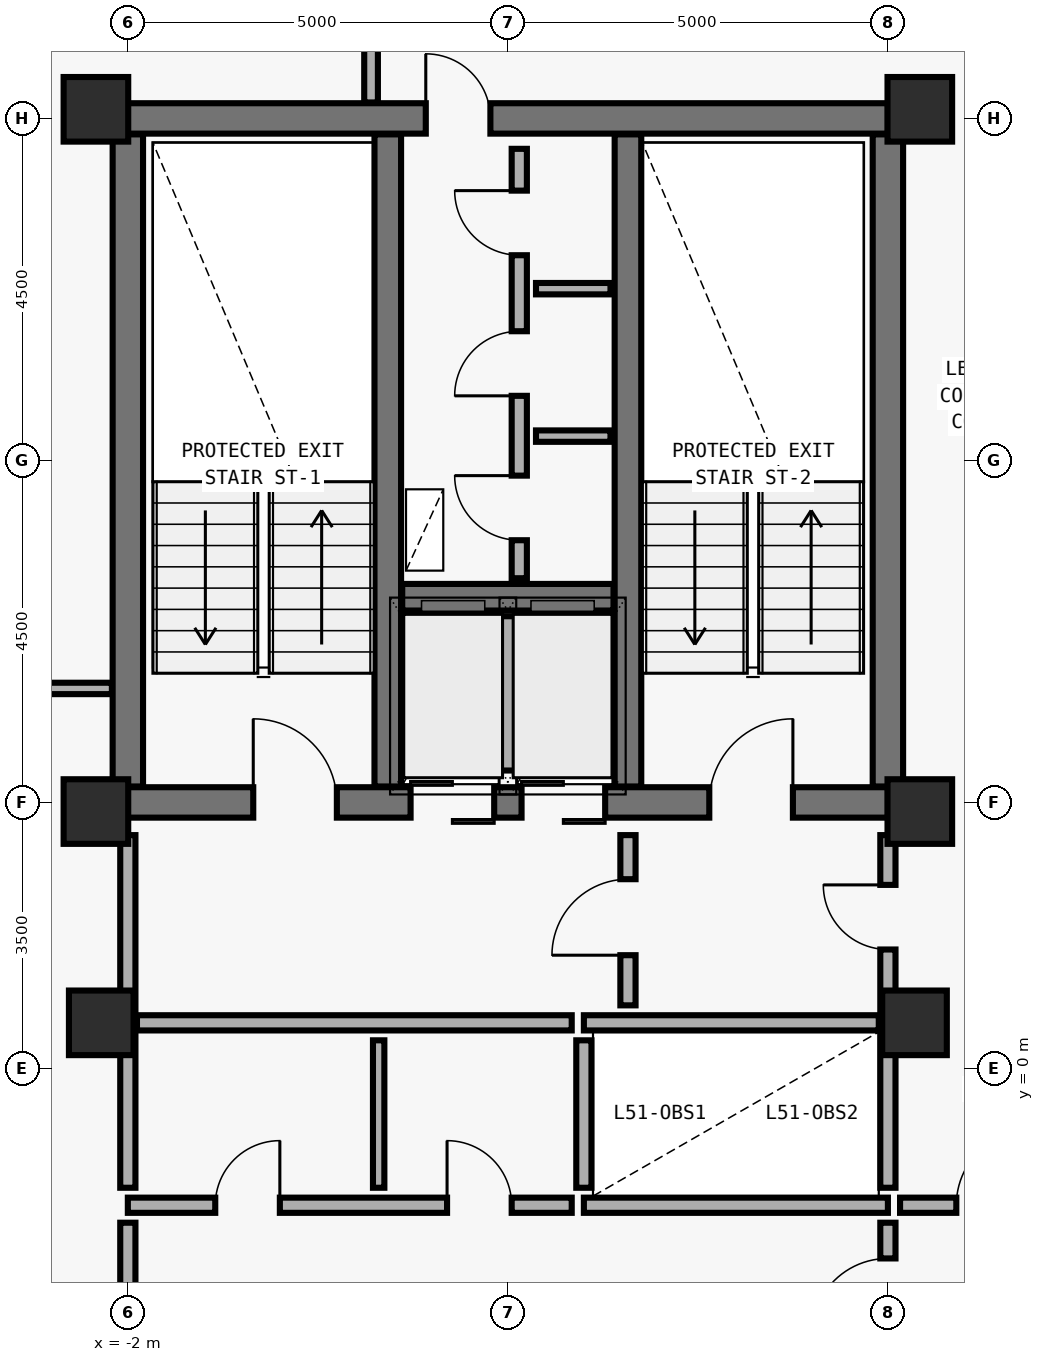
"""IFC4 building model, lengths in metres.
Left out: names, types, materials, properties, quantities, classifications, styles, units other than length and angle.
Written with IfcOpenShell. Run it as: python <this file> out.ifc"""

import sys

from ifc_helpers import new_model, si_unit, direction, frame, frame_2d, origin, origin_2d, place, context, subcontext, project, spatial, rectangle, extrude, element, fill, save


model = new_model("IFC4")
c1 = context("Model", 3, precision=1e-05, world=origin(), true_north=direction((0.0, 1.0)))
c2 = subcontext(c1, "Body", "Model", "MODEL_VIEW")
j1 = project(units=[si_unit("LENGTHUNIT", "METRE"), si_unit("PLANEANGLEUNIT", "RADIAN")], contexts=[c1])
p1 = place(None, origin())
s1 = spatial("IfcSite", under=j1, at=p1, CompositionType="ELEMENT")
p2 = place(p1, origin())
s2 = spatial("IfcBuilding", under=s1, at=p2, CompositionType="ELEMENT")
p3 = place(p2, frame((0.0, 0.0, 204.0)))
s3 = spatial("IfcBuildingStorey", under=s2, at=p3, CompositionType="ELEMENT", Elevation=204.0)
p4 = place(p3, frame((-2.0, 3.5, 0.0), z_axis=(0.0, 0.0, 1.0), x_axis=(1.0, 0.0, 0.0)))
e1 = element("IfcWall", 1, at=p4, inside=s3, PredefinedType="SHEAR", context=c2, shape_type="SweptSolid", body=[
    extrude(rectangle(XDim=10.0, YDim=0.4, at=frame_2d((5.0, 0.0))), origin(), (0.0, 0.0, 1.0), 3.592),
])
p5 = place(p4, frame((1.65, 0.0, 0.0)))
e2 = element("IfcOpeningElement", 2, at=p5, cuts=e1, PredefinedType="OPENING", context=c2, shape_type="SweptSolid", body=[
    extrude(rectangle(XDim=1.1, YDim=2.15, at=frame_2d((0.55, 1.075))), frame((0.0, 0.21, 0.0), z_axis=(0.0, -1.0, 0.0), x_axis=(1.0, 0.0, 0.0)), (0.0, 0.0, 1.0), 0.42),
])
p6 = place(p4, frame((7.65, 0.0, 0.0)))
e3 = element("IfcOpeningElement", 3, at=p6, cuts=e1, PredefinedType="OPENING", context=c2, shape_type="SweptSolid", body=[
    extrude(rectangle(XDim=1.1, YDim=2.15, at=frame_2d((0.55, 1.075))), frame((0.0, 0.21, 0.0), z_axis=(0.0, -1.0, 0.0), x_axis=(1.0, 0.0, 0.0)), (0.0, 0.0, 1.0), 0.42),
])
p7 = place(p4, frame((3.72, 0.0, 0.0)))
e4 = element("IfcOpeningElement", 4, at=p7, cuts=e1, PredefinedType="OPENING", context=c2, shape_type="SweptSolid", body=[
    extrude(rectangle(XDim=1.1, YDim=2.2, at=frame_2d((0.55, 1.1))), frame((0.0, 0.21, 0.0), z_axis=(0.0, -1.0, 0.0), x_axis=(1.0, 0.0, 0.0)), (0.0, 0.0, 1.0), 0.42),
])
p8 = place(p4, frame((5.18, 0.0, 0.0)))
e5 = element("IfcOpeningElement", 5, at=p8, cuts=e1, PredefinedType="OPENING", context=c2, shape_type="SweptSolid", body=[
    extrude(rectangle(XDim=1.1, YDim=2.2, at=frame_2d((0.55, 1.1))), frame((0.0, 0.21, 0.0), z_axis=(0.0, -1.0, 0.0), x_axis=(1.0, 0.0, 0.0)), (0.0, 0.0, 1.0), 0.42),
])
p9 = place(p3, frame((-2.0, 12.5, 0.0), z_axis=(0.0, 0.0, 1.0), x_axis=(1.0, 0.0, 0.0)))
e6 = element("IfcWall", 6, at=p9, inside=s3, PredefinedType="SHEAR", context=c2, shape_type="SweptSolid", body=[
    extrude(rectangle(XDim=10.0, YDim=0.4, at=frame_2d((5.0, 0.0))), origin(), (0.0, 0.0, 1.0), 3.592),
])
p10 = place(p9, frame((3.92, 0.0, 0.0)))
e7 = element("IfcOpeningElement", 7, at=p10, cuts=e6, PredefinedType="OPENING", context=c2, shape_type="SweptSolid", body=[
    extrude(rectangle(XDim=0.85, YDim=2.1, at=frame_2d((0.425, 1.05))), frame((0.0, 0.21, 0.0), z_axis=(0.0, -1.0, 0.0), x_axis=(1.0, 0.0, 0.0)), (0.0, 0.0, 1.0), 0.42),
])
for number, where, z_axis, x_axis in (
    (8, (-2.0, 3.71, 0.0), (0.0, 0.0, 1.0), (0.0, 1.0, 0.0)),
    (9, (8.0, 3.71, 0.0), (0.0, 0.0, 1.0), (0.0, 1.0, 0.0)),
):
    element("IfcWall", number, at=place(p3, frame(where, z_axis=z_axis, x_axis=x_axis)), inside=s3, PredefinedType="SHEAR", context=c2, shape_type="SweptSolid", body=[
        extrude(rectangle(XDim=8.58, YDim=0.4, at=frame_2d((4.29, 0.0))), origin(), (0.0, 0.0, 1.0), 3.592),
    ])
for number, where, z_axis, x_axis in (
    (10, (1.42, 3.71, 0.0), (0.0, 0.0, 1.0), (0.0, 1.0, 0.0)),
    (11, (4.58, 3.71, 0.0), (0.0, 0.0, 1.0), (0.0, 1.0, 0.0)),
):
    element("IfcWall", number, at=place(p3, frame(where, z_axis=z_axis, x_axis=x_axis)), inside=s3, PredefinedType="SHEAR", context=c2, shape_type="SweptSolid", body=[
        extrude(rectangle(XDim=8.58, YDim=0.35, at=frame_2d((4.29, 0.0))), origin(), (0.0, 0.0, 1.0), 3.592),
    ])
p11 = place(p3, frame((1.61, 6.2, 0.0), z_axis=(0.0, 0.0, 1.0), x_axis=(1.0, 0.0, 0.0)))
e12 = element("IfcWall", 12, at=p11, inside=s3, PredefinedType="SHEAR", context=c2, shape_type="SweptSolid", body=[
    extrude(rectangle(XDim=2.78, YDim=0.35, at=frame_2d((1.39, 0.0))), origin(), (0.0, 0.0, 1.0), 3.592),
])
for number, where, z_axis, x_axis in (
    (13, (-2.42, 12.62, 0.0), (0.0, 0.0, 1.0), (1.0, 0.0, 0.0)),
    (14, (8.42, 12.62, 0.0), (0.0, 0.0, 1.0), (1.0, 0.0, 0.0)),
    (15, (-2.42, 3.38, 0.0), (0.0, 0.0, 1.0), (1.0, 0.0, 0.0)),
    (16, (8.42, 3.38, 0.0), (0.0, 0.0, 1.0), (1.0, 0.0, 0.0)),
    (17, (-2.35, 0.6, 0.0), (0.0, 0.0, 1.0), (1.0, 0.0, 0.0)),
    (18, (8.35, 0.6, 0.0), (0.0, 0.0, 1.0), (1.0, 0.0, 0.0)),
):
    element("IfcColumn", number, at=place(p3, frame(where, z_axis=z_axis, x_axis=x_axis)), inside=s3, PredefinedType="COLUMN", context=c2, shape_type="SweptSolid", body=[
        extrude(rectangle(XDim=0.85, YDim=0.85, at=origin_2d()), origin(), (0.0, 0.0, 1.0), 3.575),
    ])
p12 = place(p3, frame((3.0, 3.92, 0.0), z_axis=(0.0, 0.0, 1.0), x_axis=(0.0, 1.0, 0.0)))
e19 = element("IfcWall", 19, at=p12, inside=s3, PredefinedType="SOLIDWALL", context=c2, shape_type="SweptSolid", body=[
    extrude(rectangle(XDim=2.03, YDim=0.2, at=frame_2d((1.015, 0.0))), origin(), (0.0, 0.0, 1.0), 3.36),
])
p13 = place(p3, frame((4.0, 0.6, 0.0), z_axis=(0.0, 0.0, 1.0), x_axis=(1.0, 0.0, 0.0)))
e20 = element("IfcWall", 20, at=p13, inside=s3, PredefinedType="SOLIDWALL", context=c2, shape_type="SweptSolid", body=[
    extrude(rectangle(XDim=3.88, YDim=0.2, at=frame_2d((1.94, 0.0))), origin(), (0.0, 0.0, 1.0), 3.012),
])
p14 = place(p3, frame((4.0, -1.8, 0.0), z_axis=(0.0, 0.0, 1.0), x_axis=(1.0, 0.0, 0.0)))
e21 = element("IfcWall", 21, at=p14, inside=s3, PredefinedType="SOLIDWALL", context=c2, shape_type="SweptSolid", body=[
    extrude(rectangle(XDim=4.0, YDim=0.2, at=frame_2d((2.0, 0.0))), origin(), (0.0, 0.0, 1.0), 3.36),
])
p15 = place(p3, frame((4.0, -1.57, 0.0), z_axis=(0.0, 0.0, 1.0), x_axis=(0.0, 1.0, 0.0)))
e22 = element("IfcWall", 22, at=p15, inside=s3, PredefinedType="SOLIDWALL", context=c2, shape_type="SweptSolid", body=[
    extrude(rectangle(XDim=1.94, YDim=0.2, at=frame_2d((0.97, 0.0))), origin(), (0.0, 0.0, 1.0), 3.36),
])
p16 = place(p3, frame((8.0, -1.57, 0.0), z_axis=(0.0, 0.0, 1.0), x_axis=(0.0, 1.0, 0.0)))
e23 = element("IfcWall", 23, at=p16, inside=s3, PredefinedType="SOLIDWALL", context=c2, shape_type="SweptSolid", body=[
    extrude(rectangle(XDim=2.05, YDim=0.2, at=frame_2d((1.025, 0.0))), origin(), (0.0, 0.0, 1.0), 3.012),
])
p17 = place(p3, frame((3.15, 6.45, 0.0), z_axis=(0.0, 0.0, 1.0), x_axis=(0.0, 1.0, 0.0)))
e24 = element("IfcWall", 24, at=p17, inside=s3, PredefinedType="MOVABLE", context=c2, shape_type="SweptSolid", body=[
    extrude(rectangle(XDim=5.65, YDim=0.2, at=frame_2d((2.825, 0.0))), origin(), (0.0, 0.0, 1.0), 3.36),
])
p18 = place(p17, frame((0.5, 0.0, 0.0)))
e25 = element("IfcOpeningElement", 25, at=p18, cuts=e24, PredefinedType="OPENING", context=c2, shape_type="SweptSolid", body=[
    extrude(rectangle(XDim=0.85, YDim=2.1, at=frame_2d((0.425, 1.05))), frame((0.0, 0.11, 0.0), z_axis=(0.0, -1.0, 0.0), x_axis=(1.0, 0.0, 0.0)), (0.0, 0.0, 1.0), 0.22),
])
p19 = place(p17, frame((2.4, 0.0, 0.0)))
e26 = element("IfcOpeningElement", 26, at=p19, cuts=e24, PredefinedType="OPENING", context=c2, shape_type="SweptSolid", body=[
    extrude(rectangle(XDim=0.85, YDim=2.1, at=frame_2d((0.425, 1.05))), frame((0.0, 0.11, 0.0), z_axis=(0.0, -1.0, 0.0), x_axis=(1.0, 0.0, 0.0)), (0.0, 0.0, 1.0), 0.22),
])
p20 = place(p17, frame((4.25, 0.0, 0.0)))
e27 = element("IfcOpeningElement", 27, at=p20, cuts=e24, PredefinedType="OPENING", context=c2, shape_type="SweptSolid", body=[
    extrude(rectangle(XDim=0.85, YDim=2.1, at=frame_2d((0.425, 1.05))), frame((0.0, 0.11, 0.0), z_axis=(0.0, -1.0, 0.0), x_axis=(1.0, 0.0, 0.0)), (0.0, 0.0, 1.0), 0.22),
])
p21 = place(p3, frame((4.58, 0.83, 0.0), z_axis=(0.0, 0.0, 1.0), x_axis=(0.0, 1.0, 0.0)))
e28 = element("IfcWall", 28, at=p21, inside=s3, PredefinedType="MOVABLE", context=c2, shape_type="SweptSolid", body=[
    extrude(rectangle(XDim=2.24, YDim=0.2, at=frame_2d((1.12, 0.0))), origin(), (0.0, 0.0, 1.0), 3.36),
])
p22 = place(p21, frame((0.66, 0.0, 0.0)))
e29 = element("IfcOpeningElement", 29, at=p22, cuts=e28, PredefinedType="OPENING", context=c2, shape_type="SweptSolid", body=[
    extrude(rectangle(XDim=1.0, YDim=2.1, at=frame_2d((0.5, 1.05))), frame((0.0, 0.11, 0.0), z_axis=(0.0, -1.0, 0.0), x_axis=(1.0, 0.0, 0.0)), (0.0, 0.0, 1.0), 0.22),
])
p23 = place(p3, frame((8.0, 0.72, 0.0), z_axis=(0.0, 0.0, 1.0), x_axis=(0.0, 1.0, 0.0)))
e30 = element("IfcWall", 30, at=p23, inside=s3, PredefinedType="MOVABLE", context=c2, shape_type="SweptSolid", body=[
    extrude(rectangle(XDim=2.35, YDim=0.2, at=frame_2d((1.175, 0.0))), origin(), (0.0, 0.0, 1.0), 2.692),
])
p24 = place(p23, frame((0.845, 0.0, 0.0)))
e31 = element("IfcOpeningElement", 31, at=p24, cuts=e30, PredefinedType="OPENING", context=c2, shape_type="SweptSolid", body=[
    extrude(rectangle(XDim=0.85, YDim=2.1, at=frame_2d((0.425, 1.05))), frame((0.0, 0.11, 0.0), z_axis=(0.0, -1.0, 0.0), x_axis=(1.0, 0.0, 0.0)), (0.0, 0.0, 1.0), 0.22),
])
p25 = place(p3, frame((8.0, -3.97, 0.0), z_axis=(0.0, 0.0, 1.0), x_axis=(0.0, 1.0, 0.0)))
e32 = element("IfcWall", 32, at=p25, inside=s3, PredefinedType="MOVABLE", context=c2, shape_type="SweptSolid", body=[
    extrude(rectangle(XDim=1.94, YDim=0.2, at=frame_2d((0.97, 0.0))), origin(), (0.0, 0.0, 1.0), 3.012),
])
p26 = place(p25, frame((0.47, 0.0, 0.0)))
e33 = element("IfcOpeningElement", 33, at=p26, cuts=e32, PredefinedType="OPENING", context=c2, shape_type="SweptSolid", body=[
    extrude(rectangle(XDim=1.0, YDim=2.1, at=frame_2d((0.5, 1.05))), frame((0.0, 0.11, 0.0), z_axis=(0.0, -1.0, 0.0), x_axis=(1.0, 0.0, 0.0)), (0.0, 0.0, 1.0), 0.22),
])
p27 = place(p3, frame((-2.0, -1.8, 0.0), z_axis=(0.0, 0.0, 1.0), x_axis=(1.0, 0.0, 0.0)))
e34 = element("IfcWall", 34, at=p27, inside=s3, PredefinedType="MOVABLE", context=c2, shape_type="SweptSolid", body=[
    extrude(rectangle(XDim=5.84, YDim=0.2, at=frame_2d((2.92, 0.0))), origin(), (0.0, 0.0, 1.0), 3.36),
])
p28 = place(p27, frame((1.15, 0.0, 0.0)))
e35 = element("IfcOpeningElement", 35, at=p28, cuts=e34, PredefinedType="OPENING", context=c2, shape_type="SweptSolid", body=[
    extrude(rectangle(XDim=0.85, YDim=2.1, at=frame_2d((0.425, 1.05))), frame((0.0, 0.11, 0.0), z_axis=(0.0, -1.0, 0.0), x_axis=(1.0, 0.0, 0.0)), (0.0, 0.0, 1.0), 0.22),
])
p29 = place(p27, frame((4.2, 0.0, 0.0)))
e36 = element("IfcOpeningElement", 36, at=p29, cuts=e34, PredefinedType="OPENING", context=c2, shape_type="SweptSolid", body=[
    extrude(rectangle(XDim=0.85, YDim=2.1, at=frame_2d((0.425, 1.05))), frame((0.0, 0.11, 0.0), z_axis=(0.0, -1.0, 0.0), x_axis=(1.0, 0.0, 0.0)), (0.0, 0.0, 1.0), 0.22),
])
p30 = place(p3, frame((8.16, -1.8, 0.0), z_axis=(0.0, 0.0, 1.0), x_axis=(1.0, 0.0, 0.0)))
e37 = element("IfcWall", 37, at=p30, inside=s3, PredefinedType="MOVABLE", context=c2, shape_type="SweptSolid", body=[
    extrude(rectangle(XDim=2.64, YDim=0.2, at=frame_2d((1.32, 0.0))), origin(), (0.0, 0.0, 1.0), 3.36),
])
p31 = place(p30, frame((0.74, 0.0, 0.0)))
e38 = element("IfcOpeningElement", 38, at=p31, cuts=e37, PredefinedType="OPENING", context=c2, shape_type="SweptSolid", body=[
    extrude(rectangle(XDim=1.0, YDim=2.1, at=frame_2d((0.5, 1.05))), frame((0.0, 0.11, 0.0), z_axis=(0.0, -1.0, 0.0), x_axis=(1.0, 0.0, 0.0)), (0.0, 0.0, 1.0), 0.22),
])
for number, where, z_axis, x_axis in (
    (39, (3.37, 8.32, 0.0), (0.0, 0.0, 1.0), (1.0, 0.0, 0.0)),
    (40, (3.37, 10.26, 0.0), (0.0, 0.0, 1.0), (1.0, 0.0, 0.0)),
):
    element("IfcWall", number, at=place(p3, frame(where, z_axis=z_axis, x_axis=x_axis)), inside=s3, PredefinedType="PARTITIONING", context=c2, shape_type="SweptSolid", body=[
        extrude(rectangle(XDim=0.98, YDim=0.15, at=frame_2d((0.49, 0.0))), origin(), (0.0, 0.0, 1.0), 3.36),
    ])
p32 = place(p3, frame((-1.88, 0.6, 0.0), z_axis=(0.0, 0.0, 1.0), x_axis=(1.0, 0.0, 0.0)))
e41 = element("IfcWall", 41, at=p32, inside=s3, PredefinedType="MOVABLE", context=c2, shape_type="SweptSolid", body=[
    extrude(rectangle(XDim=5.72, YDim=0.2, at=frame_2d((2.86, 0.0))), origin(), (0.0, 0.0, 1.0), 3.012),
])
p33 = place(p3, frame((-2.0, 0.72, 0.0), z_axis=(0.0, 0.0, 1.0), x_axis=(0.0, 1.0, 0.0)))
e42 = element("IfcWall", 42, at=p33, inside=s3, PredefinedType="MOVABLE", context=c2, shape_type="SweptSolid", body=[
    extrude(rectangle(XDim=2.35, YDim=0.2, at=frame_2d((1.175, 0.0))), origin(), (0.0, 0.0, 1.0), 2.692),
])
p34 = place(p3, frame((-2.0, -3.97, 0.0), z_axis=(0.0, 0.0, 1.0), x_axis=(0.0, 1.0, 0.0)))
e43 = element("IfcWall", 43, at=p34, inside=s3, PredefinedType="MOVABLE", context=c2, shape_type="SweptSolid", body=[
    extrude(rectangle(XDim=1.94, YDim=0.2, at=frame_2d((0.97, 0.0))), origin(), (0.0, 0.0, 1.0), 3.012),
])
p35 = place(p3, frame((1.3, -1.57, 0.0), z_axis=(0.0, 0.0, 1.0), x_axis=(0.0, 1.0, 0.0)))
e44 = element("IfcWall", 44, at=p35, inside=s3, PredefinedType="PARTITIONING", context=c2, shape_type="SweptSolid", body=[
    extrude(rectangle(XDim=1.94, YDim=0.15, at=frame_2d((0.97, 0.0))), origin(), (0.0, 0.0, 1.0), 3.36),
])
p36 = place(p3, frame((-2.0, -1.57, 0.0), z_axis=(0.0, 0.0, 1.0), x_axis=(0.0, 1.0, 0.0)))
e45 = element("IfcWall", 45, at=p36, inside=s3, PredefinedType="MOVABLE", context=c2, shape_type="SweptSolid", body=[
    extrude(rectangle(XDim=2.05, YDim=0.2, at=frame_2d((1.025, 0.0))), origin(), (0.0, 0.0, 1.0), 3.012),
])
p37 = place(p3, frame((-4.465, 5.0, 0.0), z_axis=(0.0, 0.0, 1.0), x_axis=(1.0, 0.0, 0.0)))
e46 = element("IfcWall", 46, at=p37, inside=s3, PredefinedType="PARTITIONING", context=c2, shape_type="SweptSolid", body=[
    extrude(rectangle(XDim=2.255, YDim=0.15, at=frame_2d((1.127, 0.0))), origin(), (0.0, 0.0, 1.0), 3.36),
])
p38 = place(p3, frame((1.2, 14.6, 0.0), z_axis=(0.0, 0.0, 1.0), x_axis=(0.0, -1.0, 0.0)))
e47 = element("IfcWall", 47, at=p38, inside=s3, PredefinedType="PLUMBINGWALL", context=c2, shape_type="SweptSolid", body=[
    extrude(rectangle(XDim=1.89, YDim=0.18, at=frame_2d((0.945, 0.0))), origin(), (0.0, 0.0, 1.0), 3.36),
])
p39 = place(p5, origin())
e48 = element("IfcDoor", 48, at=p39, inside=s3, OperationType="SINGLE_SWING_LEFT", PredefinedType="DOOR", context=c2, shape_type="SweptSolid", body=[
    extrude(rectangle(XDim=1.1, YDim=2.15, at=frame_2d((0.55, 1.075))), frame((0.0, 0.025, 0.0), z_axis=(0.0, -1.0, 0.0), x_axis=(1.0, 0.0, 0.0)), (0.0, 0.0, 1.0), 0.05),
])
fill(e2, e48)
p40 = place(p6, origin())
e49 = element("IfcDoor", 49, at=p40, inside=s3, OperationType="SINGLE_SWING_RIGHT", PredefinedType="DOOR", context=c2, shape_type="SweptSolid", body=[
    extrude(rectangle(XDim=1.1, YDim=2.15, at=frame_2d((0.55, 1.075))), frame((0.0, 0.025, 0.0), z_axis=(0.0, -1.0, 0.0), x_axis=(1.0, 0.0, 0.0)), (0.0, 0.0, 1.0), 0.05),
])
fill(e3, e49)
p41 = place(p7, origin())
e50 = element("IfcDoor", 50, at=p41, inside=s3, OperationType="DOUBLE_DOOR_SLIDING", PredefinedType="DOOR", context=c2, shape_type="SweptSolid", body=[
    extrude(rectangle(XDim=1.1, YDim=2.2, at=frame_2d((0.55, 1.1))), frame((0.0, 0.025, 0.0), z_axis=(0.0, -1.0, 0.0), x_axis=(1.0, 0.0, 0.0)), (0.0, 0.0, 1.0), 0.05),
])
fill(e4, e50)
p42 = place(p8, origin())
e51 = element("IfcDoor", 51, at=p42, inside=s3, OperationType="DOUBLE_DOOR_SLIDING", PredefinedType="DOOR", context=c2, shape_type="SweptSolid", body=[
    extrude(rectangle(XDim=1.1, YDim=2.2, at=frame_2d((0.55, 1.1))), frame((0.0, 0.025, 0.0), z_axis=(0.0, -1.0, 0.0), x_axis=(1.0, 0.0, 0.0)), (0.0, 0.0, 1.0), 0.05),
])
fill(e5, e51)
p43 = place(p10, origin())
e52 = element("IfcDoor", 52, at=p43, inside=s3, OperationType="SINGLE_SWING_LEFT", PredefinedType="DOOR", context=c2, shape_type="SweptSolid", body=[
    extrude(rectangle(XDim=0.85, YDim=2.1, at=frame_2d((0.425, 1.05))), frame((0.0, 0.025, 0.0), z_axis=(0.0, -1.0, 0.0), x_axis=(1.0, 0.0, 0.0)), (0.0, 0.0, 1.0), 0.05),
])
fill(e7, e52)
p44 = place(p18, origin())
e53 = element("IfcDoor", 53, at=p44, inside=s3, OperationType="SINGLE_SWING_RIGHT", PredefinedType="DOOR", context=c2, shape_type="SweptSolid", body=[
    extrude(rectangle(XDim=0.85, YDim=2.1, at=frame_2d((0.425, 1.05))), frame((0.0, 0.025, 0.0), z_axis=(0.0, -1.0, 0.0), x_axis=(1.0, 0.0, 0.0)), (0.0, 0.0, 1.0), 0.05),
])
fill(e25, e53)
p45 = place(p19, origin())
e54 = element("IfcDoor", 54, at=p45, inside=s3, OperationType="SINGLE_SWING_LEFT", PredefinedType="DOOR", context=c2, shape_type="SweptSolid", body=[
    extrude(rectangle(XDim=0.85, YDim=2.1, at=frame_2d((0.425, 1.05))), frame((0.0, 0.025, 0.0), z_axis=(0.0, -1.0, 0.0), x_axis=(1.0, 0.0, 0.0)), (0.0, 0.0, 1.0), 0.05),
])
fill(e26, e54)
p46 = place(p20, origin())
e55 = element("IfcDoor", 55, at=p46, inside=s3, OperationType="SINGLE_SWING_RIGHT", PredefinedType="DOOR", context=c2, shape_type="SweptSolid", body=[
    extrude(rectangle(XDim=0.85, YDim=2.1, at=frame_2d((0.425, 1.05))), frame((0.0, 0.025, 0.0), z_axis=(0.0, -1.0, 0.0), x_axis=(1.0, 0.0, 0.0)), (0.0, 0.0, 1.0), 0.05),
])
fill(e27, e55)
p47 = place(p22, origin())
e56 = element("IfcDoor", 56, at=p47, inside=s3, OperationType="SINGLE_SWING_LEFT", PredefinedType="DOOR", context=c2, shape_type="SweptSolid", body=[
    extrude(rectangle(XDim=1.0, YDim=2.1, at=frame_2d((0.5, 1.05))), frame((0.0, 0.025, 0.0), z_axis=(0.0, -1.0, 0.0), x_axis=(1.0, 0.0, 0.0)), (0.0, 0.0, 1.0), 0.05),
])
fill(e29, e56)
p48 = place(p24, origin())
e57 = element("IfcDoor", 57, at=p48, inside=s3, OperationType="SINGLE_SWING_RIGHT", PredefinedType="DOOR", context=c2, shape_type="SweptSolid", body=[
    extrude(rectangle(XDim=0.85, YDim=2.1, at=frame_2d((0.425, 1.05))), frame((0.0, 0.025, 0.0), z_axis=(0.0, -1.0, 0.0), x_axis=(1.0, 0.0, 0.0)), (0.0, 0.0, 1.0), 0.05),
])
fill(e31, e57)
p49 = place(p26, origin())
e58 = element("IfcDoor", 58, at=p49, inside=s3, OperationType="SINGLE_SWING_LEFT", PredefinedType="DOOR", context=c2, shape_type="SweptSolid", body=[
    extrude(rectangle(XDim=1.0, YDim=2.1, at=frame_2d((0.5, 1.05))), frame((0.0, 0.025, 0.0), z_axis=(0.0, -1.0, 0.0), x_axis=(1.0, 0.0, 0.0)), (0.0, 0.0, 1.0), 0.05),
])
fill(e33, e58)
p50 = place(p28, origin())
e59 = element("IfcDoor", 59, at=p50, inside=s3, OperationType="SINGLE_SWING_RIGHT", PredefinedType="DOOR", context=c2, shape_type="SweptSolid", body=[
    extrude(rectangle(XDim=0.85, YDim=2.1, at=frame_2d((0.425, 1.05))), frame((0.0, 0.025, 0.0), z_axis=(0.0, -1.0, 0.0), x_axis=(1.0, 0.0, 0.0)), (0.0, 0.0, 1.0), 0.05),
])
fill(e35, e59)
p51 = place(p29, origin())
e60 = element("IfcDoor", 60, at=p51, inside=s3, OperationType="SINGLE_SWING_LEFT", PredefinedType="DOOR", context=c2, shape_type="SweptSolid", body=[
    extrude(rectangle(XDim=0.85, YDim=2.1, at=frame_2d((0.425, 1.05))), frame((0.0, 0.025, 0.0), z_axis=(0.0, -1.0, 0.0), x_axis=(1.0, 0.0, 0.0)), (0.0, 0.0, 1.0), 0.05),
])
fill(e36, e60)
p52 = place(p31, origin())
e61 = element("IfcDoor", 61, at=p52, inside=s3, OperationType="SINGLE_SWING_RIGHT", PredefinedType="DOOR", context=c2, shape_type="SweptSolid", body=[
    extrude(rectangle(XDim=1.0, YDim=2.1, at=frame_2d((0.5, 1.05))), frame((0.0, 0.025, 0.0), z_axis=(0.0, -1.0, 0.0), x_axis=(1.0, 0.0, 0.0)), (0.0, 0.0, 1.0), 0.05),
])
fill(e38, e61)
save(model, sys.argv[1])
